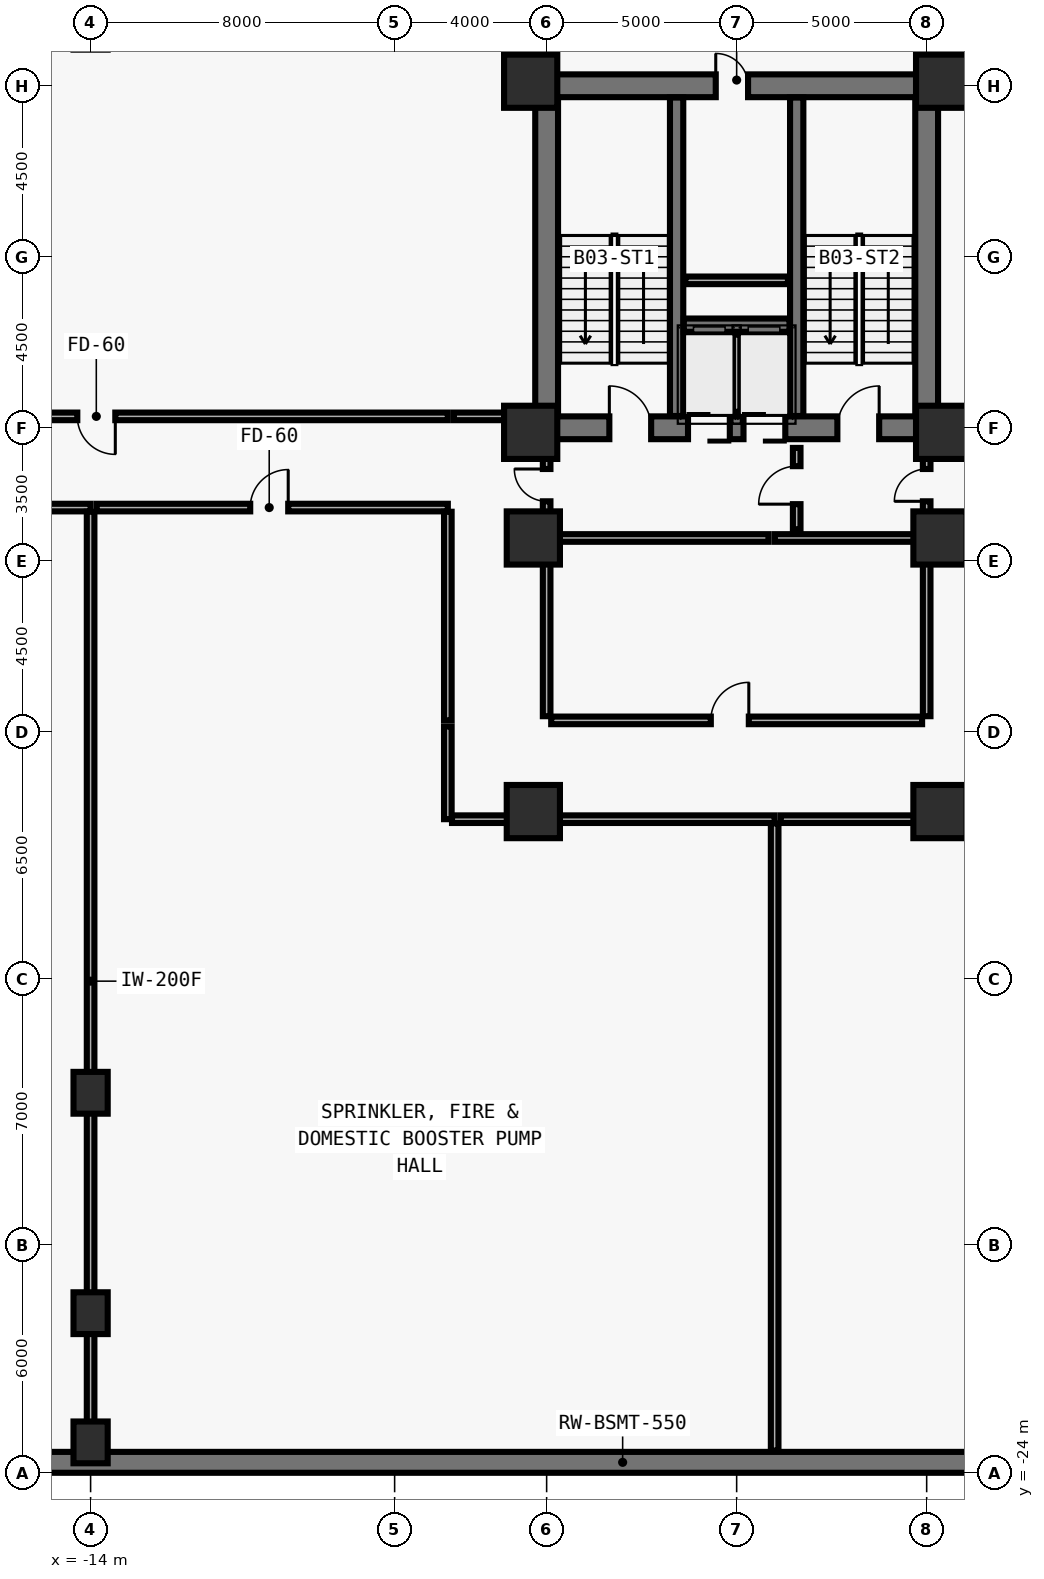
"""IFC4 building model, lengths in metres.
Left out: names, types, materials, properties, quantities, classifications, styles, units other than length and angle.
Written with IfcOpenShell. Run it as: python <this file> out.ifc"""

import sys

from ifc_helpers import new_model, si_unit, direction, frame, frame_2d, origin, origin_2d, place, context, subcontext, project, spatial, rectangle, extrude, element, fill, save


model = new_model("IFC4")
c1 = context("Model", 3, precision=1e-05, world=origin(), true_north=direction((0.0, 1.0)))
c2 = subcontext(c1, "Body", "Model", "MODEL_VIEW")
j1 = project(units=[si_unit("LENGTHUNIT", "METRE"), si_unit("PLANEANGLEUNIT", "RADIAN")], contexts=[c1])
p1 = place(None, origin())
s1 = spatial("IfcSite", under=j1, at=p1, CompositionType="ELEMENT")
p2 = place(p1, origin())
s2 = spatial("IfcBuilding", under=s1, at=p2, CompositionType="ELEMENT")
p3 = place(p2, frame((0.0, 0.0, -13.5)))
s3 = spatial("IfcBuildingStorey", under=s2, at=p3, CompositionType="ELEMENT", Elevation=-13.5)
p4 = place(p3, frame((-2.0, 3.5, 0.0), z_axis=(0.0, 0.0, 1.0), x_axis=(1.0, 0.0, 0.0)))
e1 = element("IfcWall", 1, at=p4, inside=s3, PredefinedType="SHEAR", context=c2, shape_type="SweptSolid", body=[
    extrude(rectangle(XDim=10.0, YDim=0.6, at=frame_2d((5.0, 0.0))), origin(), (0.0, 0.0, 1.0), 4.492),
])
p5 = place(p4, frame((1.65, 0.0, 0.0)))
e2 = element("IfcOpeningElement", 2, at=p5, cuts=e1, PredefinedType="OPENING", context=c2, shape_type="SweptSolid", body=[
    extrude(rectangle(XDim=1.1, YDim=2.15, at=frame_2d((0.55, 1.075))), frame((0.0, 0.31, 0.0), z_axis=(0.0, -1.0, 0.0), x_axis=(1.0, 0.0, 0.0)), (0.0, 0.0, 1.0), 0.62),
])
p6 = place(p4, frame((7.65, 0.0, 0.0)))
e3 = element("IfcOpeningElement", 3, at=p6, cuts=e1, PredefinedType="OPENING", context=c2, shape_type="SweptSolid", body=[
    extrude(rectangle(XDim=1.1, YDim=2.15, at=frame_2d((0.55, 1.075))), frame((0.0, 0.31, 0.0), z_axis=(0.0, -1.0, 0.0), x_axis=(1.0, 0.0, 0.0)), (0.0, 0.0, 1.0), 0.62),
])
p7 = place(p4, frame((3.72, 0.0, 0.0)))
e4 = element("IfcOpeningElement", 4, at=p7, cuts=e1, PredefinedType="OPENING", context=c2, shape_type="SweptSolid", body=[
    extrude(rectangle(XDim=1.1, YDim=2.2, at=frame_2d((0.55, 1.1))), frame((0.0, 0.31, 0.0), z_axis=(0.0, -1.0, 0.0), x_axis=(1.0, 0.0, 0.0)), (0.0, 0.0, 1.0), 0.62),
])
p8 = place(p4, frame((5.18, 0.0, 0.0)))
e5 = element("IfcOpeningElement", 5, at=p8, cuts=e1, PredefinedType="OPENING", context=c2, shape_type="SweptSolid", body=[
    extrude(rectangle(XDim=1.1, YDim=2.2, at=frame_2d((0.55, 1.1))), frame((0.0, 0.31, 0.0), z_axis=(0.0, -1.0, 0.0), x_axis=(1.0, 0.0, 0.0)), (0.0, 0.0, 1.0), 0.62),
])
p9 = place(p3, frame((-2.0, 12.5, 0.0), z_axis=(0.0, 0.0, 1.0), x_axis=(1.0, 0.0, 0.0)))
e6 = element("IfcWall", 6, at=p9, inside=s3, PredefinedType="SHEAR", context=c2, shape_type="SweptSolid", body=[
    extrude(rectangle(XDim=10.0, YDim=0.6, at=frame_2d((5.0, 0.0))), origin(), (0.0, 0.0, 1.0), 4.492),
])
p10 = place(p9, frame((4.45, 0.0, 0.0)))
e7 = element("IfcOpeningElement", 7, at=p10, cuts=e6, PredefinedType="OPENING", context=c2, shape_type="SweptSolid", body=[
    extrude(rectangle(XDim=0.85, YDim=2.1, at=frame_2d((0.425, 1.05))), frame((0.0, 0.31, 0.0), z_axis=(0.0, -1.0, 0.0), x_axis=(1.0, 0.0, 0.0)), (0.0, 0.0, 1.0), 0.62),
])
for number, where, z_axis, x_axis in (
    (8, (-2.0, 3.81, 0.0), (0.0, 0.0, 1.0), (0.0, 1.0, 0.0)),
    (9, (8.0, 3.81, 0.0), (0.0, 0.0, 1.0), (0.0, 1.0, 0.0)),
):
    element("IfcWall", number, at=place(p3, frame(where, z_axis=z_axis, x_axis=x_axis)), inside=s3, PredefinedType="SHEAR", context=c2, shape_type="SweptSolid", body=[
        extrude(rectangle(XDim=8.38, YDim=0.6, at=frame_2d((4.19, 0.0))), origin(), (0.0, 0.0, 1.0), 4.492),
    ])
for number, where, z_axis, x_axis in (
    (10, (1.42, 3.81, 0.0), (0.0, 0.0, 1.0), (0.0, 1.0, 0.0)),
    (11, (4.58, 3.81, 0.0), (0.0, 0.0, 1.0), (0.0, 1.0, 0.0)),
):
    element("IfcWall", number, at=place(p3, frame(where, z_axis=z_axis, x_axis=x_axis)), inside=s3, PredefinedType="SHEAR", context=c2, shape_type="SweptSolid", body=[
        extrude(rectangle(XDim=8.38, YDim=0.35, at=frame_2d((4.19, 0.0))), origin(), (0.0, 0.0, 1.0), 4.492),
    ])
p11 = place(p3, frame((1.61, 6.2, 0.0), z_axis=(0.0, 0.0, 1.0), x_axis=(1.0, 0.0, 0.0)))
e12 = element("IfcWall", 12, at=p11, inside=s3, PredefinedType="SHEAR", context=c2, shape_type="SweptSolid", body=[
    extrude(rectangle(XDim=2.78, YDim=0.35, at=frame_2d((1.39, 0.0))), origin(), (0.0, 0.0, 1.0), 4.492),
])
p12 = place(p3, frame((-33.725, -23.725, 0.0), z_axis=(0.0, 0.0, 1.0), x_axis=(1.0, 0.0, 0.0)))
e13 = element("IfcWall", 13, at=p12, inside=s3, PredefinedType="SOLIDWALL", context=c2, shape_type="SweptSolid", body=[
    extrude(rectangle(XDim=67.45, YDim=0.55, at=frame_2d((33.725, 0.0))), origin(), (0.0, 0.0, 1.0), 4.492),
])
for number, where, z_axis, x_axis in (
    (14, (-2.42, 12.62, 0.0), (0.0, 0.0, 1.0), (1.0, 0.0, 0.0)),
    (15, (8.42, 12.62, 0.0), (0.0, 0.0, 1.0), (1.0, 0.0, 0.0)),
    (16, (-2.42, 3.38, 0.0), (0.0, 0.0, 1.0), (1.0, 0.0, 0.0)),
    (17, (8.42, 3.38, 0.0), (0.0, 0.0, 1.0), (1.0, 0.0, 0.0)),
    (18, (-2.35, 0.6, 0.0), (0.0, 0.0, 1.0), (1.0, 0.0, 0.0)),
    (19, (8.35, 0.6, 0.0), (0.0, 0.0, 1.0), (1.0, 0.0, 0.0)),
    (20, (-2.35, -6.6, 0.0), (0.0, 0.0, 1.0), (1.0, 0.0, 0.0)),
    (21, (8.35, -6.6, 0.0), (0.0, 0.0, 1.0), (1.0, 0.0, 0.0)),
):
    element("IfcColumn", number, at=place(p3, frame(where, z_axis=z_axis, x_axis=x_axis)), inside=s3, PredefinedType="COLUMN", context=c2, shape_type="SweptSolid", body=[
        extrude(rectangle(XDim=1.4, YDim=1.4, at=origin_2d()), origin(), (0.0, 0.0, 1.0), 4.475),
    ])
for number, where, z_axis, x_axis in (
    (22, (-14.0, -23.2, 0.0), (0.0, 0.0, 1.0), (1.0, 0.0, 0.0)),
    (23, (-14.0, -19.8, 0.0), (0.0, 0.0, 1.0), (1.0, 0.0, 0.0)),
    (24, (-14.0, -14.0, 0.0), (0.0, 0.0, 1.0), (1.0, 0.0, 0.0)),
):
    element("IfcColumn", number, at=place(p3, frame(where, z_axis=z_axis, x_axis=x_axis)), inside=s3, PredefinedType="COLUMN", context=c2, shape_type="SweptSolid", body=[
        extrude(rectangle(XDim=0.9, YDim=1.1, at=origin_2d()), origin(), (0.0, 0.0, 1.0), 4.475),
    ])
p13 = place(p3, frame((3.0, 3.92, 0.0), z_axis=(0.0, 0.0, 1.0), x_axis=(0.0, 1.0, 0.0)))
e25 = element("IfcWall", 25, at=p13, inside=s3, PredefinedType="SOLIDWALL", context=c2, shape_type="SweptSolid", body=[
    extrude(rectangle(XDim=2.03, YDim=0.2, at=frame_2d((1.015, 0.0))), origin(), (0.0, 0.0, 1.0), 4.18),
])
p14 = place(p3, frame((1.65, 7.38, 0.0), z_axis=(0.0, 0.0, 1.0), x_axis=(1.0, 0.0, 0.0)))
e26 = element("IfcWall", 26, at=p14, inside=s3, PredefinedType="SOLIDWALL", context=c2, shape_type="SweptSolid", body=[
    extrude(rectangle(XDim=2.7, YDim=0.2, at=frame_2d((1.35, 0.0))), origin(), (0.0, 0.0, 1.0), 4.18),
])
p15 = place(p3, frame((4.0, 0.6, 0.0), z_axis=(0.0, 0.0, 1.0), x_axis=(1.0, 0.0, 0.0)))
e27 = element("IfcWall", 27, at=p15, inside=s3, PredefinedType="SOLIDWALL", context=c2, shape_type="SweptSolid", body=[
    extrude(rectangle(XDim=3.88, YDim=0.2, at=frame_2d((1.94, 0.0))), origin(), (0.0, 0.0, 1.0), 3.362),
])
p16 = place(p3, frame((4.58, 0.83, 0.0), z_axis=(0.0, 0.0, 1.0), x_axis=(0.0, 1.0, 0.0)))
e28 = element("IfcWall", 28, at=p16, inside=s3, PredefinedType="MOVABLE", context=c2, shape_type="SweptSolid", body=[
    extrude(rectangle(XDim=2.14, YDim=0.2, at=frame_2d((1.07, 0.0))), origin(), (0.0, 0.0, 1.0), 4.18),
])
p17 = place(p16, frame((0.66, 0.0, 0.0)))
e29 = element("IfcOpeningElement", 29, at=p17, cuts=e28, PredefinedType="OPENING", context=c2, shape_type="SweptSolid", body=[
    extrude(rectangle(XDim=1.0, YDim=2.1, at=frame_2d((0.5, 1.05))), frame((0.0, 0.11, 0.0), z_axis=(0.0, -1.0, 0.0), x_axis=(1.0, 0.0, 0.0)), (0.0, 0.0, 1.0), 0.22),
])
p18 = place(p3, frame((-2.0, 0.72, 0.0), z_axis=(0.0, 0.0, 1.0), x_axis=(0.0, 1.0, 0.0)))
e30 = element("IfcWall", 30, at=p18, inside=s3, PredefinedType="MOVABLE", context=c2, shape_type="SweptSolid", body=[
    extrude(rectangle(XDim=2.25, YDim=0.2, at=frame_2d((1.125, 0.0))), origin(), (0.0, 0.0, 1.0), 3.262),
])
p19 = place(p18, frame((0.845, 0.0, 0.0)))
e31 = element("IfcOpeningElement", 31, at=p19, cuts=e30, PredefinedType="OPENING", context=c2, shape_type="SweptSolid", body=[
    extrude(rectangle(XDim=0.85, YDim=2.1, at=frame_2d((0.425, 1.05))), frame((0.0, 0.11, 0.0), z_axis=(0.0, -1.0, 0.0), x_axis=(1.0, 0.0, 0.0)), (0.0, 0.0, 1.0), 0.22),
])
p20 = place(p3, frame((8.0, 0.72, 0.0), z_axis=(0.0, 0.0, 1.0), x_axis=(0.0, 1.0, 0.0)))
e32 = element("IfcWall", 32, at=p20, inside=s3, PredefinedType="MOVABLE", context=c2, shape_type="SweptSolid", body=[
    extrude(rectangle(XDim=2.25, YDim=0.2, at=frame_2d((1.125, 0.0))), origin(), (0.0, 0.0, 1.0), 3.262),
])
p21 = place(p20, frame((0.845, 0.0, 0.0)))
e33 = element("IfcOpeningElement", 33, at=p21, cuts=e32, PredefinedType="OPENING", context=c2, shape_type="SweptSolid", body=[
    extrude(rectangle(XDim=0.85, YDim=2.1, at=frame_2d((0.425, 1.05))), frame((0.0, 0.11, 0.0), z_axis=(0.0, -1.0, 0.0), x_axis=(1.0, 0.0, 0.0)), (0.0, 0.0, 1.0), 0.22),
])
p22 = place(p3, frame((-1.88, -4.2, 0.0), z_axis=(0.0, 0.0, 1.0), x_axis=(1.0, 0.0, 0.0)))
e34 = element("IfcWall", 34, at=p22, inside=s3, PredefinedType="MOVABLE", context=c2, shape_type="SweptSolid", body=[
    extrude(rectangle(XDim=9.76, YDim=0.2, at=frame_2d((4.88, 0.0))), origin(), (0.0, 0.0, 1.0), 4.18),
])
p23 = place(p22, frame((4.2, 0.0, 0.0)))
e35 = element("IfcOpeningElement", 35, at=p23, cuts=e34, PredefinedType="OPENING", context=c2, shape_type="SweptSolid", body=[
    extrude(rectangle(XDim=1.0, YDim=2.1, at=frame_2d((0.5, 1.05))), frame((0.0, 0.11, 0.0), z_axis=(0.0, -1.0, 0.0), x_axis=(1.0, 0.0, 0.0)), (0.0, 0.0, 1.0), 0.22),
])
p24 = place(p3, frame((-32.2, 1.4, 0.0), z_axis=(0.0, 0.0, 1.0), x_axis=(1.0, 0.0, 0.0)))
e36 = element("IfcWall", 36, at=p24, inside=s3, PredefinedType="MOVABLE", context=c2, shape_type="SweptSolid", body=[
    extrude(rectangle(XDim=18.2, YDim=0.2, at=frame_2d((9.1, 0.0))), origin(), (0.0, 0.0, 1.0), 4.18),
])
p25 = place(p24, frame((8.6, 0.0, 0.0)))
e37 = element("IfcOpeningElement", 37, at=p25, cuts=e36, PredefinedType="OPENING", context=c2, shape_type="SweptSolid", body=[
    extrude(rectangle(XDim=1.0, YDim=2.1, at=frame_2d((0.5, 1.05))), frame((0.0, 0.11, 0.0), z_axis=(0.0, -1.0, 0.0), x_axis=(1.0, 0.0, 0.0)), (0.0, 0.0, 1.0), 0.22),
])
p26 = place(p3, frame((-13.84, 1.4, 0.0), z_axis=(0.0, 0.0, 1.0), x_axis=(1.0, 0.0, 0.0)))
e38 = element("IfcWall", 38, at=p26, inside=s3, PredefinedType="MOVABLE", context=c2, shape_type="SweptSolid", body=[
    extrude(rectangle(XDim=9.24, YDim=0.2, at=frame_2d((4.62, 0.0))), origin(), (0.0, 0.0, 1.0), 4.18),
])
p27 = place(p26, frame((4.04, 0.0, 0.0)))
e39 = element("IfcOpeningElement", 39, at=p27, cuts=e38, PredefinedType="OPENING", context=c2, shape_type="SweptSolid", body=[
    extrude(rectangle(XDim=1.0, YDim=2.1, at=frame_2d((0.5, 1.05))), frame((0.0, 0.11, 0.0), z_axis=(0.0, -1.0, 0.0), x_axis=(1.0, 0.0, 0.0)), (0.0, 0.0, 1.0), 0.22),
])
p28 = place(p3, frame((-4.6, 3.8, 0.0), z_axis=(0.0, 0.0, 1.0), x_axis=(-1.0, 0.0, 0.0)))
e40 = element("IfcWall", 40, at=p28, inside=s3, PredefinedType="MOVABLE", context=c2, shape_type="SweptSolid", body=[
    extrude(rectangle(XDim=18.5, YDim=0.2, at=frame_2d((9.25, 0.0))), origin(), (0.0, 0.0, 1.0), 4.18),
])
p29 = place(p28, frame((8.75, 0.0, 0.0)))
e41 = element("IfcOpeningElement", 41, at=p29, cuts=e40, PredefinedType="OPENING", context=c2, shape_type="SweptSolid", body=[
    extrude(rectangle(XDim=1.0, YDim=2.1, at=frame_2d((0.5, 1.05))), frame((0.0, 0.11, 0.0), z_axis=(0.0, -1.0, 0.0), x_axis=(1.0, 0.0, 0.0)), (0.0, 0.0, 1.0), 0.22),
])
p30 = place(p3, frame((-1.88, 0.6, 0.0), z_axis=(0.0, 0.0, 1.0), x_axis=(1.0, 0.0, 0.0)))
e42 = element("IfcWall", 42, at=p30, inside=s3, PredefinedType="MOVABLE", context=c2, shape_type="SweptSolid", body=[
    extrude(rectangle(XDim=5.72, YDim=0.2, at=frame_2d((2.86, 0.0))), origin(), (0.0, 0.0, 1.0), 3.362),
])
for number, where, z_axis, x_axis in (
    (43, (-2.0, -4.09, 0.0), (0.0, 0.0, 1.0), (0.0, 1.0, 0.0)),
    (44, (8.0, -4.09, 0.0), (0.0, 0.0, 1.0), (0.0, 1.0, 0.0)),
):
    element("IfcWall", number, at=place(p3, frame(where, z_axis=z_axis, x_axis=x_axis)), inside=s3, PredefinedType="MOVABLE", context=c2, shape_type="SweptSolid", body=[
        extrude(rectangle(XDim=4.59, YDim=0.2, at=frame_2d((2.295, 0.0))), origin(), (0.0, 0.0, 1.0), 3.362),
    ])
p31 = place(p3, frame((-2.0, -6.8, 0.0), z_axis=(0.0, 0.0, 1.0), x_axis=(1.0, 0.0, 0.0)))
e45 = element("IfcWall", 45, at=p31, inside=s3, PredefinedType="MOVABLE", context=c2, shape_type="SweptSolid", body=[
    extrude(rectangle(XDim=6.0, YDim=0.2, at=frame_2d((3.0, 0.0))), origin(), (0.0, 0.0, 1.0), 3.362),
])
p32 = place(p3, frame((-4.6, 1.29, 0.0), z_axis=(0.0, 0.0, 1.0), x_axis=(0.0, -1.0, 0.0)))
e46 = element("IfcWall", 46, at=p32, inside=s3, PredefinedType="MOVABLE", context=c2, shape_type="SweptSolid", body=[
    extrude(rectangle(XDim=5.49, YDim=0.2, at=frame_2d((2.745, 0.0))), origin(), (0.0, 0.0, 1.0), 4.18),
])
p33 = place(p3, frame((-4.6, -4.36, 0.0), z_axis=(0.0, 0.0, 1.0), x_axis=(0.0, -1.0, 0.0)))
e47 = element("IfcWall", 47, at=p33, inside=s3, PredefinedType="MOVABLE", context=c2, shape_type="SweptSolid", body=[
    extrude(rectangle(XDim=2.44, YDim=0.2, at=frame_2d((1.22, 0.0))), origin(), (0.0, 0.0, 1.0), 4.18),
])
p34 = place(p3, frame((-4.49, -6.8, 0.0), z_axis=(0.0, 0.0, 1.0), x_axis=(1.0, 0.0, 0.0)))
e48 = element("IfcWall", 48, at=p34, inside=s3, PredefinedType="MOVABLE", context=c2, shape_type="SweptSolid", body=[
    extrude(rectangle(XDim=2.33, YDim=0.2, at=frame_2d((1.165, 0.0))), origin(), (0.0, 0.0, 1.0), 4.18),
])
p35 = place(p3, frame((4.16, -6.8, 0.0), z_axis=(0.0, 0.0, 1.0), x_axis=(1.0, 0.0, 0.0)))
e49 = element("IfcWall", 49, at=p35, inside=s3, PredefinedType="MOVABLE", context=c2, shape_type="SweptSolid", body=[
    extrude(rectangle(XDim=3.84, YDim=0.2, at=frame_2d((1.92, 0.0))), origin(), (0.0, 0.0, 1.0), 3.362),
])
p36 = place(p3, frame((8.16, -6.8, 0.0), z_axis=(0.0, 0.0, 1.0), x_axis=(1.0, 0.0, 0.0)))
e50 = element("IfcWall", 50, at=p36, inside=s3, PredefinedType="MOVABLE", context=c2, shape_type="SweptSolid", body=[
    extrude(rectangle(XDim=2.44, YDim=0.2, at=frame_2d((1.22, 0.0))), origin(), (0.0, 0.0, 1.0), 4.18),
])
p37 = place(p3, frame((-2.36, 3.8, 0.0), z_axis=(0.0, 0.0, 1.0), x_axis=(-1.0, 0.0, 0.0)))
e51 = element("IfcWall", 51, at=p37, inside=s3, PredefinedType="MOVABLE", context=c2, shape_type="SweptSolid", body=[
    extrude(rectangle(XDim=2.08, YDim=0.2, at=frame_2d((1.04, 0.0))), origin(), (0.0, 0.0, 1.0), 4.18),
])
p38 = place(p3, frame((-14.0, 1.29, 0.0), z_axis=(0.0, 0.0, 1.0), x_axis=(0.0, -1.0, 0.0)))
e52 = element("IfcWall", 52, at=p38, inside=s3, PredefinedType="MOVABLE", context=c2, shape_type="SweptSolid", body=[
    extrude(rectangle(XDim=24.705, YDim=0.2, at=frame_2d((12.353, 0.0))), origin(), (0.0, 0.0, 1.0), 3.462),
])
p39 = place(p3, frame((4.0, -6.91, 0.0), z_axis=(0.0, 0.0, 1.0), x_axis=(0.0, -1.0, 0.0)))
e53 = element("IfcWall", 53, at=p39, inside=s3, PredefinedType="MOVABLE", context=c2, shape_type="SweptSolid", body=[
    extrude(rectangle(XDim=16.505, YDim=0.2, at=frame_2d((8.252, 0.0))), origin(), (0.0, 0.0, 1.0), 4.18),
])
p40 = place(p5, origin())
e54 = element("IfcDoor", 54, at=p40, inside=s3, OperationType="SINGLE_SWING_LEFT", PredefinedType="DOOR", context=c2, shape_type="SweptSolid", body=[
    extrude(rectangle(XDim=1.1, YDim=2.15, at=frame_2d((0.55, 1.075))), frame((0.0, 0.025, 0.0), z_axis=(0.0, -1.0, 0.0), x_axis=(1.0, 0.0, 0.0)), (0.0, 0.0, 1.0), 0.05),
])
fill(e2, e54)
p41 = place(p6, origin())
e55 = element("IfcDoor", 55, at=p41, inside=s3, OperationType="SINGLE_SWING_RIGHT", PredefinedType="DOOR", context=c2, shape_type="SweptSolid", body=[
    extrude(rectangle(XDim=1.1, YDim=2.15, at=frame_2d((0.55, 1.075))), frame((0.0, 0.025, 0.0), z_axis=(0.0, -1.0, 0.0), x_axis=(1.0, 0.0, 0.0)), (0.0, 0.0, 1.0), 0.05),
])
fill(e3, e55)
p42 = place(p7, origin())
e56 = element("IfcDoor", 56, at=p42, inside=s3, OperationType="DOUBLE_DOOR_SLIDING", PredefinedType="DOOR", context=c2, shape_type="SweptSolid", body=[
    extrude(rectangle(XDim=1.1, YDim=2.2, at=frame_2d((0.55, 1.1))), frame((0.0, 0.025, 0.0), z_axis=(0.0, -1.0, 0.0), x_axis=(1.0, 0.0, 0.0)), (0.0, 0.0, 1.0), 0.05),
])
fill(e4, e56)
p43 = place(p8, origin())
e57 = element("IfcDoor", 57, at=p43, inside=s3, OperationType="DOUBLE_DOOR_SLIDING", PredefinedType="DOOR", context=c2, shape_type="SweptSolid", body=[
    extrude(rectangle(XDim=1.1, YDim=2.2, at=frame_2d((0.55, 1.1))), frame((0.0, 0.025, 0.0), z_axis=(0.0, -1.0, 0.0), x_axis=(1.0, 0.0, 0.0)), (0.0, 0.0, 1.0), 0.05),
])
fill(e5, e57)
p44 = place(p10, origin())
e58 = element("IfcDoor", 58, at=p44, inside=s3, OperationType="SINGLE_SWING_LEFT", PredefinedType="DOOR", context=c2, shape_type="SweptSolid", body=[
    extrude(rectangle(XDim=0.85, YDim=2.1, at=frame_2d((0.425, 1.05))), frame((0.0, 0.025, 0.0), z_axis=(0.0, -1.0, 0.0), x_axis=(1.0, 0.0, 0.0)), (0.0, 0.0, 1.0), 0.05),
])
fill(e7, e58)
p45 = place(p17, origin())
e59 = element("IfcDoor", 59, at=p45, inside=s3, OperationType="SINGLE_SWING_LEFT", PredefinedType="DOOR", context=c2, shape_type="SweptSolid", body=[
    extrude(rectangle(XDim=1.0, YDim=2.1, at=frame_2d((0.5, 1.05))), frame((0.0, 0.025, 0.0), z_axis=(0.0, -1.0, 0.0), x_axis=(1.0, 0.0, 0.0)), (0.0, 0.0, 1.0), 0.05),
])
fill(e29, e59)
p46 = place(p19, origin())
e60 = element("IfcDoor", 60, at=p46, inside=s3, OperationType="SINGLE_SWING_RIGHT", PredefinedType="DOOR", context=c2, shape_type="SweptSolid", body=[
    extrude(rectangle(XDim=0.85, YDim=2.1, at=frame_2d((0.425, 1.05))), frame((0.0, 0.025, 0.0), z_axis=(0.0, -1.0, 0.0), x_axis=(1.0, 0.0, 0.0)), (0.0, 0.0, 1.0), 0.05),
])
fill(e31, e60)
p47 = place(p21, origin())
e61 = element("IfcDoor", 61, at=p47, inside=s3, OperationType="SINGLE_SWING_LEFT", PredefinedType="DOOR", context=c2, shape_type="SweptSolid", body=[
    extrude(rectangle(XDim=0.85, YDim=2.1, at=frame_2d((0.425, 1.05))), frame((0.0, 0.025, 0.0), z_axis=(0.0, -1.0, 0.0), x_axis=(1.0, 0.0, 0.0)), (0.0, 0.0, 1.0), 0.05),
])
fill(e33, e61)
p48 = place(p23, origin())
e62 = element("IfcDoor", 62, at=p48, inside=s3, OperationType="SINGLE_SWING_RIGHT", PredefinedType="DOOR", context=c2, shape_type="SweptSolid", body=[
    extrude(rectangle(XDim=1.0, YDim=2.1, at=frame_2d((0.5, 1.05))), frame((0.0, 0.025, 0.0), z_axis=(0.0, -1.0, 0.0), x_axis=(1.0, 0.0, 0.0)), (0.0, 0.0, 1.0), 0.05),
])
fill(e35, e62)
p49 = place(p27, origin())
e63 = element("IfcDoor", 63, at=p49, inside=s3, OperationType="SINGLE_SWING_RIGHT", PredefinedType="DOOR", context=c2, shape_type="SweptSolid", body=[
    extrude(rectangle(XDim=1.0, YDim=2.1, at=frame_2d((0.5, 1.05))), frame((0.0, 0.025, 0.0), z_axis=(0.0, -1.0, 0.0), x_axis=(1.0, 0.0, 0.0)), (0.0, 0.0, 1.0), 0.05),
])
fill(e39, e63)
p50 = place(p29, origin())
e64 = element("IfcDoor", 64, at=p50, inside=s3, OperationType="SINGLE_SWING_LEFT", PredefinedType="DOOR", context=c2, shape_type="SweptSolid", body=[
    extrude(rectangle(XDim=1.0, YDim=2.1, at=frame_2d((0.5, 1.05))), frame((0.0, 0.025, 0.0), z_axis=(0.0, -1.0, 0.0), x_axis=(1.0, 0.0, 0.0)), (0.0, 0.0, 1.0), 0.05),
])
fill(e41, e64)
save(model, sys.argv[1])
